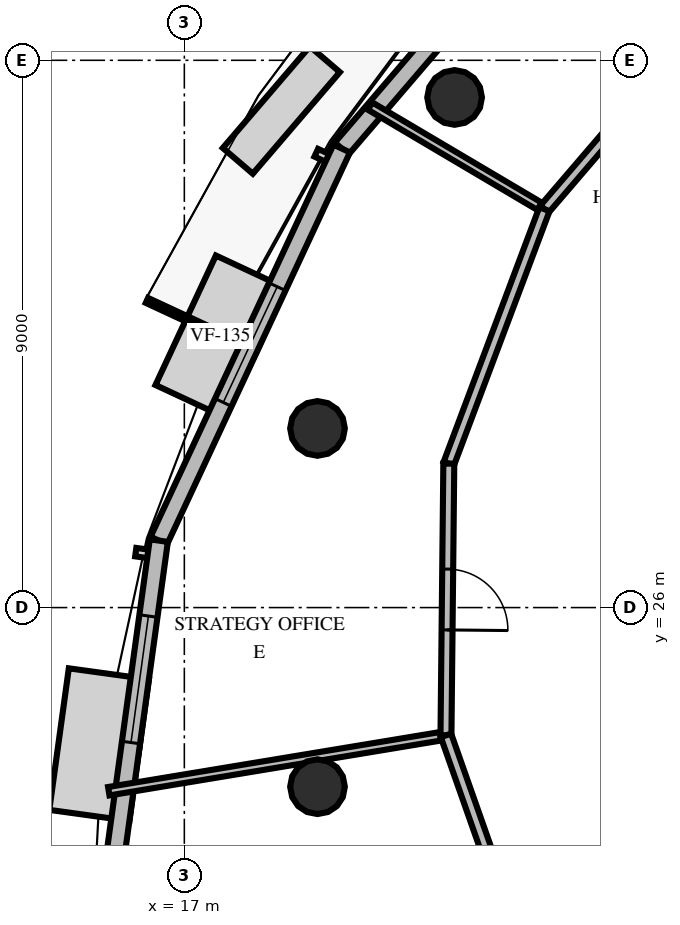
"""IFC4 building model, lengths in metres.
Left out: names, types, materials, properties, quantities, classifications, styles, units other than length and angle.
Written with IfcOpenShell. Run it as: python <this file> out.ifc"""

import sys

from ifc_helpers import new_model, si_unit, direction, frame, frame_2d, origin, origin_2d, place, context, subcontext, project, spatial, rectangle, circle, extrude, element, fill, save


model = new_model("IFC4")
c1 = context("Model", 3, precision=1e-05, world=origin(), true_north=direction((0.0, 1.0)))
c2 = subcontext(c1, "Body", "Model", "MODEL_VIEW")
j1 = project(units=[si_unit("LENGTHUNIT", "METRE"), si_unit("PLANEANGLEUNIT", "RADIAN")], contexts=[c1])
p1 = place(None, origin())
s1 = spatial("IfcSite", under=j1, at=p1, CompositionType="ELEMENT")
p2 = place(p1, origin())
s2 = spatial("IfcBuilding", under=s1, at=p2, CompositionType="ELEMENT")
p3 = place(p2, frame((0.0, 0.0, 237.6)))
s3 = spatial("IfcBuildingStorey", under=s2, at=p3, CompositionType="ELEMENT", Elevation=237.6)
for number, where, z_axis, x_axis in (
    (1, (21.445, 34.389, 0.0), (0.0, 0.0, 1.0), (1.0, 0.0, 0.0)),
    (2, (19.19, 28.946, 0.0), (0.0, 0.0, 1.0), (1.0, 0.0, 0.0)),
    (3, (19.19, 23.054, 0.0), (0.0, 0.0, 1.0), (1.0, 0.0, 0.0)),
):
    element("IfcColumn", number, at=place(p3, frame(where, z_axis=z_axis, x_axis=x_axis)), inside=s3, PredefinedType="COLUMN", context=c2, shape_type="SweptSolid", body=[
        extrude(circle(Radius=0.45, at=origin_2d()), origin(), (0.0, 0.0, 1.0), 3.6),
    ])
p4 = place(p3, frame((24.335, 39.087, 0.0), z_axis=(0.0, 0.0, 1.0), x_axis=(-0.650777589735, -0.759268416767, 0.0)))
e4 = element("IfcWall", 4, at=p4, inside=s3, PredefinedType="SOLIDWALL", context=c2, shape_type="SweptSolid", body=[
    extrude(rectangle(XDim=7.293, YDim=0.3, at=frame_2d((3.646, 0.0))), origin(), (0.0, 0.0, 1.0), 2.76),
])
p5 = place(p4, frame((1.87, 0.0, 0.0)))
e5 = element("IfcOpeningElement", 5, at=p5, cuts=e4, PredefinedType="OPENING", context=c2, shape_type="SweptSolid", body=[
    extrude(rectangle(XDim=1.05, YDim=2.15, at=frame_2d((0.525, 1.075))), frame((0.0, 0.16, 0.0), z_axis=(0.0, -1.0, 0.0), x_axis=(1.0, 0.0, 0.0)), (0.0, 0.0, 1.0), 0.32),
])
p6 = place(p3, frame((19.588, 33.55, 0.0), z_axis=(0.0, 0.0, 1.0), x_axis=(-0.422755852514, -0.90624361469, 0.0)))
e6 = element("IfcWall", 6, at=p6, inside=s3, PredefinedType="SOLIDWALL", context=c2, shape_type="SweptSolid", body=[
    extrude(rectangle(XDim=7.115, YDim=0.3, at=frame_2d((3.558, 0.0))), origin(), (0.0, 0.0, 1.0), 2.76),
])
p7 = place(p6, frame((2.508, 0.0, 0.8)))
e7 = element("IfcOpeningElement", 7, at=p7, cuts=e6, PredefinedType="OPENING", context=c2, shape_type="SweptSolid", body=[
    extrude(rectangle(XDim=2.1, YDim=1.85, at=frame_2d((1.05, 0.925))), frame((0.0, 0.16, 0.0), z_axis=(0.0, -1.0, 0.0), x_axis=(1.0, 0.0, 0.0)), (0.0, 0.0, 1.0), 0.32),
])
p8 = place(p3, frame((16.58, 27.101, 0.0), z_axis=(0.0, 0.0, 1.0), x_axis=(-0.136531687657, -0.990635704114, 0.0)))
e8 = element("IfcWall", 8, at=p8, inside=s3, PredefinedType="SOLIDWALL", context=c2, shape_type="SweptSolid", body=[
    extrude(rectangle(XDim=6.643, YDim=0.3, at=frame_2d((3.322, 0.0))), origin(), (0.0, 0.0, 1.0), 2.76),
])
p9 = place(p8, frame((1.252, 0.0, 0.8)))
e9 = element("IfcOpeningElement", 9, at=p9, cuts=e8, PredefinedType="OPENING", context=c2, shape_type="SweptSolid", body=[
    extrude(rectangle(XDim=2.1, YDim=1.85, at=frame_2d((1.05, 0.925))), frame((0.0, 0.16, 0.0), z_axis=(0.0, -1.0, 0.0), x_axis=(1.0, 0.0, 0.0)), (0.0, 0.0, 1.0), 0.32),
])
p10 = place(p3, frame((22.922, 32.552, 0.0), z_axis=(0.0, 0.0, 1.0), x_axis=(-0.860754301827, 0.509020659587, 0.0)))
e10 = element("IfcWall", 10, at=p10, inside=s3, PredefinedType="PARTITIONING", context=c2, shape_type="SweptSolid", body=[
    extrude(rectangle(XDim=3.331, YDim=0.14, at=frame_2d((1.666, 0.0))), origin(), (0.0, 0.0, 1.0), 2.46),
])
p11 = place(p3, frame((25.831, 35.945, 0.0), z_axis=(0.0, 0.0, 1.0), x_axis=(-0.650782376626, -0.759264313841, 0.0)))
e11 = element("IfcWall", 11, at=p11, inside=s3, PredefinedType="PARTITIONING", context=c2, shape_type="SweptSolid", body=[
    extrude(rectangle(XDim=4.469, YDim=0.18, at=frame_2d((2.235, 0.0))), origin(), (0.0, 0.0, 1.0), 2.46),
])
p12 = place(p11, frame((0.942, 0.0, 0.0)))
e12 = element("IfcOpeningElement", 12, at=p12, cuts=e11, PredefinedType="OPENING", context=c2, shape_type="SweptSolid", body=[
    extrude(rectangle(XDim=1.0, YDim=2.15, at=frame_2d((0.5, 1.075))), frame((0.0, 0.1, 0.0), z_axis=(0.0, -1.0, 0.0), x_axis=(1.0, 0.0, 0.0)), (0.0, 0.0, 1.0), 0.2),
])
p13 = place(p3, frame((21.303, 23.898, 0.0), z_axis=(0.0, 0.0, 1.0), x_axis=(-0.986575267792, -0.163307198191, 0.0)))
e13 = element("IfcWall", 13, at=p13, inside=s3, PredefinedType="PARTITIONING", context=c2, shape_type="SweptSolid", body=[
    extrude(rectangle(XDim=5.621, YDim=0.14, at=frame_2d((2.811, 0.0))), origin(), (0.0, 0.0, 1.0), 2.46),
])
p14 = place(p3, frame((22.922, 32.552, 0.0), z_axis=(0.0, 0.0, 1.0), x_axis=(-0.351853579162, -0.936055051175, 0.0)))
e14 = element("IfcWall", 14, at=p14, inside=s3, PredefinedType="PARTITIONING", context=c2, shape_type="SweptSolid", body=[
    extrude(rectangle(XDim=4.47, YDim=0.18, at=frame_2d((2.235, 0.0))), origin(), (0.0, 0.0, 1.0), 2.46),
])
p15 = place(p3, frame((21.35, 28.367, 0.0), z_axis=(0.0, 0.0, 1.0), x_axis=(-0.010487214807, -0.999945007651, 0.0)))
e15 = element("IfcWall", 15, at=p15, inside=s3, PredefinedType="PARTITIONING", context=c2, shape_type="SweptSolid", body=[
    extrude(rectangle(XDim=4.47, YDim=0.18, at=frame_2d((2.235, 0.0))), origin(), (0.0, 0.0, 1.0), 2.46),
])
p16 = place(p15, frame((1.735, 0.0, 0.0)))
e16 = element("IfcOpeningElement", 16, at=p16, cuts=e15, PredefinedType="OPENING", context=c2, shape_type="SweptSolid", body=[
    extrude(rectangle(XDim=1.0, YDim=2.15, at=frame_2d((0.5, 1.075))), frame((0.0, 0.1, 0.0), z_axis=(0.0, -1.0, 0.0), x_axis=(1.0, 0.0, 0.0)), (0.0, 0.0, 1.0), 0.2),
])
p17 = place(p3, frame((21.303, 23.898, 0.0), z_axis=(0.0, 0.0, 1.0), x_axis=(0.332208621894, -0.943205932731, 0.0)))
e17 = element("IfcWall", 17, at=p17, inside=s3, PredefinedType="PARTITIONING", context=c2, shape_type="SweptSolid", body=[
    extrude(rectangle(XDim=4.47, YDim=0.18, at=frame_2d((2.235, 0.0))), origin(), (0.0, 0.0, 1.0), 2.46),
])
p18 = place(p17, frame((2.527, 0.0, 0.0)))
e18 = element("IfcOpeningElement", 18, at=p18, cuts=e17, PredefinedType="OPENING", context=c2, shape_type="SweptSolid", body=[
    extrude(rectangle(XDim=1.0, YDim=2.15, at=frame_2d((0.5, 1.075))), frame((0.0, 0.1, 0.0), z_axis=(0.0, -1.0, 0.0), x_axis=(1.0, 0.0, 0.0)), (0.0, 0.0, 1.0), 0.2),
])
p19 = place(p7, origin())
e19 = element("IfcWindow", 19, at=p19, inside=s3, PartitioningType="SINGLE_PANEL", PredefinedType="WINDOW", context=c2, shape_type="SweptSolid", body=[
    extrude(rectangle(XDim=2.1, YDim=1.85, at=frame_2d((1.05, 0.925))), frame((0.0, 0.03, 0.0), z_axis=(0.0, -1.0, 0.0), x_axis=(1.0, 0.0, 0.0)), (0.0, 0.0, 1.0), 0.06),
])
fill(e7, e19)
p20 = place(p9, origin())
e20 = element("IfcWindow", 20, at=p20, inside=s3, PartitioningType="SINGLE_PANEL", PredefinedType="WINDOW", context=c2, shape_type="SweptSolid", body=[
    extrude(rectangle(XDim=2.1, YDim=1.85, at=frame_2d((1.05, 0.925))), frame((0.0, 0.03, 0.0), z_axis=(0.0, -1.0, 0.0), x_axis=(1.0, 0.0, 0.0)), (0.0, 0.0, 1.0), 0.06),
])
fill(e9, e20)
p21 = place(p16, origin())
e21 = element("IfcDoor", 21, at=p21, inside=s3, OperationType="SINGLE_SWING_RIGHT", PredefinedType="DOOR", context=c2, shape_type="SweptSolid", body=[
    extrude(rectangle(XDim=1.0, YDim=2.15, at=frame_2d((0.5, 1.075))), frame((0.0, 0.025, 0.0), z_axis=(0.0, -1.0, 0.0), x_axis=(1.0, 0.0, 0.0)), (0.0, 0.0, 1.0), 0.05),
])
fill(e16, e21)
save(model, sys.argv[1])
